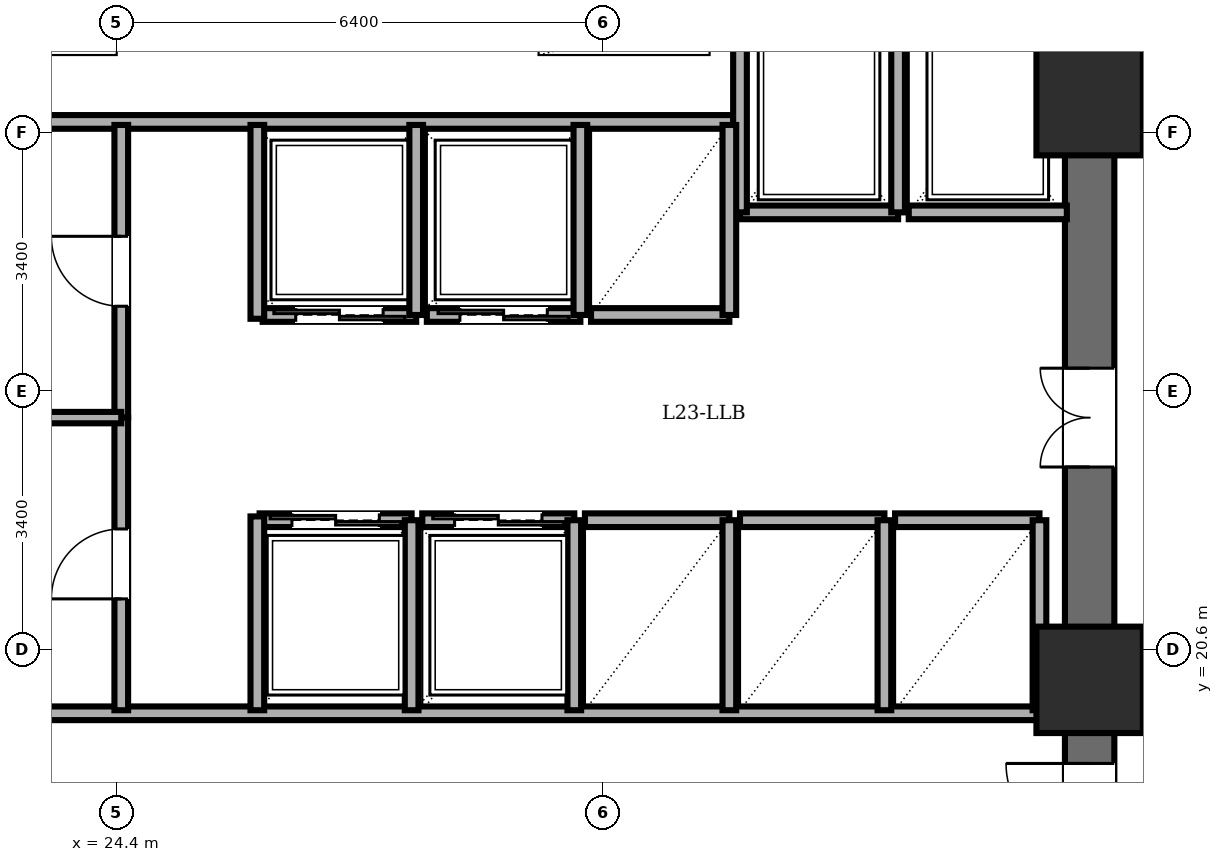
"""IFC4 building model, lengths in metres.
Left out: names, types, materials, properties, quantities, classifications, styles, units other than length and angle.
Written with IfcOpenShell. Run it as: python <this file> out.ifc"""

import sys

from ifc_helpers import new_model, si_unit, direction, frame, frame_2d, origin, origin_2d, place, context, subcontext, project, spatial, rectangle, extrude, element, fill, save


model = new_model("IFC4")
c1 = context("Model", 3, precision=1e-05, world=origin(), true_north=direction((0.0, 1.0)))
c2 = subcontext(c1, "Body", "Model", "MODEL_VIEW")
j1 = project(units=[si_unit("LENGTHUNIT", "METRE"), si_unit("PLANEANGLEUNIT", "RADIAN")], contexts=[c1])
p1 = place(None, origin())
s1 = spatial("IfcSite", under=j1, at=p1, CompositionType="ELEMENT")
p2 = place(p1, origin())
s2 = spatial("IfcBuilding", under=s1, at=p2, CompositionType="ELEMENT")
p3 = place(p2, frame((0.0, 0.0, 89.9)))
s3 = spatial("IfcBuildingStorey", under=s2, at=p3, CompositionType="ELEMENT", Elevation=89.9)
for number, where, z_axis, x_axis in (
    (1, (37.2, 20.2, 0.0), (0.0, 0.0, 1.0), (1.0, 0.0, 0.0)),
    (2, (37.2, 27.8, 0.0), (0.0, 0.0, 1.0), (1.0, 0.0, 0.0)),
):
    element("IfcColumn", number, at=place(p3, frame(where, z_axis=z_axis, x_axis=x_axis)), inside=s3, PredefinedType="COLUMN", context=c2, shape_type="SweptSolid", body=[
        extrude(rectangle(XDim=1.4, YDim=1.4, at=origin_2d()), origin(), (0.0, 0.0, 1.0), 3.6),
    ])
p4 = place(p3, frame((37.2, 14.4, 0.0), z_axis=(0.0, 0.0, 1.0), x_axis=(0.0, 1.0, 0.0)))
e3 = element("IfcWall", 3, at=p4, inside=s3, PredefinedType="SHEAR", context=c2, shape_type="SweptSolid", body=[
    extrude(rectangle(XDim=19.2, YDim=0.65, at=frame_2d((9.6, 0.0))), origin(), (0.0, 0.0, 1.0), 3.4),
])
p5 = place(p4, frame((15.8, 0.0, 0.0)))
e4 = element("IfcOpeningElement", 4, at=p5, cuts=e3, PredefinedType="OPENING", context=c2, shape_type="SweptSolid", body=[
    extrude(rectangle(XDim=1.15, YDim=2.15, at=frame_2d((0.575, 1.075))), frame((0.0, 0.335, 0.0), z_axis=(0.0, -1.0, 0.0), x_axis=(1.0, 0.0, 0.0)), (0.0, 0.0, 1.0), 0.67),
])
p6 = place(p4, frame((3.6, 0.0, 0.0)))
e5 = element("IfcOpeningElement", 5, at=p6, cuts=e3, PredefinedType="OPENING", context=c2, shape_type="SweptSolid", body=[
    extrude(rectangle(XDim=1.1, YDim=2.15, at=frame_2d((0.55, 1.075))), frame((0.0, 0.335, 0.0), z_axis=(0.0, -1.0, 0.0), x_axis=(1.0, 0.0, 0.0)), (0.0, 0.0, 1.0), 0.67),
])
p7 = place(p4, frame((8.6, 0.0, 0.0)))
e6 = element("IfcOpeningElement", 6, at=p7, cuts=e3, PredefinedType="OPENING", context=c2, shape_type="SweptSolid", body=[
    extrude(rectangle(XDim=1.3, YDim=2.2, at=frame_2d((0.65, 1.1))), frame((0.0, 0.335, 0.0), z_axis=(0.0, -1.0, 0.0), x_axis=(1.0, 0.0, 0.0)), (0.0, 0.0, 1.0), 0.67),
])
p8 = place(p3, frame((21.95, 27.54, 0.0), z_axis=(0.0, 0.0, 1.0), x_axis=(1.0, 0.0, 0.0)))
e7 = element("IfcWall", 7, at=p8, inside=s3, PredefinedType="PARTITIONING", context=c2, shape_type="SweptSolid", body=[
    extrude(rectangle(XDim=10.56, YDim=0.18, at=frame_2d((5.28, 0.0))), origin(), (0.0, 0.0, 1.0), 3.4),
])
p9 = place(p3, frame((21.95, 19.76, 0.0), z_axis=(0.0, 0.0, 1.0), x_axis=(1.0, 0.0, 0.0)))
e8 = element("IfcWall", 8, at=p9, inside=s3, PredefinedType="PARTITIONING", context=c2, shape_type="SweptSolid", body=[
    extrude(rectangle(XDim=14.87, YDim=0.18, at=frame_2d((7.435, 0.0))), origin(), (0.0, 0.0, 1.0), 3.4),
])
p10 = place(p3, frame((34.68, 26.35, 0.0), z_axis=(0.0, 0.0, 1.0), x_axis=(-1.0, 0.0, 0.0)))
e9 = element("IfcWall", 9, at=p10, inside=s3, PredefinedType="PARTITIONING", context=c2, shape_type="SweptSolid", body=[
    extrude(rectangle(XDim=2.08, YDim=0.18, at=frame_2d((1.04, 0.0))), origin(), (0.0, 0.0, 1.0), 3.4),
])
for number, where, z_axis, x_axis in (
    (10, (34.68, 26.35, 0.0), (0.0, 0.0, 1.0), (0.0, 1.0, 0.0)),
    (11, (32.6, 29.08, 0.0), (0.0, 0.0, 1.0), (0.0, -1.0, 0.0)),
):
    element("IfcWall", number, at=place(p3, frame(where, z_axis=z_axis, x_axis=x_axis)), inside=s3, PredefinedType="PARTITIONING", context=c2, shape_type="SweptSolid", body=[
        extrude(rectangle(XDim=2.73, YDim=0.18, at=frame_2d((1.365, 0.0))), origin(), (0.0, 0.0, 1.0), 3.4),
    ])
p11 = place(p3, frame((36.9, 26.35, 0.0), z_axis=(0.0, 0.0, 1.0), x_axis=(-1.0, 0.0, 0.0)))
e12 = element("IfcWall", 12, at=p11, inside=s3, PredefinedType="PARTITIONING", context=c2, shape_type="SweptSolid", body=[
    extrude(rectangle(XDim=2.08, YDim=0.18, at=frame_2d((1.04, 0.0))), origin(), (0.0, 0.0, 1.0), 3.4),
])
p12 = place(p3, frame((28.34, 25.0, 0.0), z_axis=(0.0, 0.0, 1.0), x_axis=(-1.0, 0.0, 0.0)))
e13 = element("IfcWall", 13, at=p12, inside=s3, PredefinedType="PARTITIONING", context=c2, shape_type="SweptSolid", body=[
    extrude(rectangle(XDim=2.02, YDim=0.18, at=frame_2d((1.01, 0.0))), origin(), (0.0, 0.0, 1.0), 3.4),
])
p13 = place(p12, frame((0.435, 0.0, 0.0)))
e14 = element("IfcOpeningElement", 14, at=p13, cuts=e13, PredefinedType="OPENING", context=c2, shape_type="SweptSolid", body=[
    extrude(rectangle(XDim=1.15, YDim=2.2, at=frame_2d((0.575, 1.1))), frame((0.0, 0.1, 0.0), z_axis=(0.0, -1.0, 0.0), x_axis=(1.0, 0.0, 0.0)), (0.0, 0.0, 1.0), 0.2),
])
p14 = place(p3, frame((28.34, 25.0, 0.0), z_axis=(0.0, 0.0, 1.0), x_axis=(0.0, 1.0, 0.0)))
e15 = element("IfcWall", 15, at=p14, inside=s3, PredefinedType="PARTITIONING", context=c2, shape_type="SweptSolid", body=[
    extrude(rectangle(XDim=2.5, YDim=0.18, at=frame_2d((1.25, 0.0))), origin(), (0.0, 0.0, 1.0), 3.4),
])
p15 = place(p3, frame((30.5, 25.0, 0.0), z_axis=(0.0, 0.0, 1.0), x_axis=(-1.0, 0.0, 0.0)))
e16 = element("IfcWall", 16, at=p15, inside=s3, PredefinedType="PARTITIONING", context=c2, shape_type="SweptSolid", body=[
    extrude(rectangle(XDim=2.02, YDim=0.18, at=frame_2d((1.01, 0.0))), origin(), (0.0, 0.0, 1.0), 3.4),
])
p16 = place(p15, frame((0.435, 0.0, 0.0)))
e17 = element("IfcOpeningElement", 17, at=p16, cuts=e16, PredefinedType="OPENING", context=c2, shape_type="SweptSolid", body=[
    extrude(rectangle(XDim=1.15, YDim=2.2, at=frame_2d((0.575, 1.1))), frame((0.0, 0.1, 0.0), z_axis=(0.0, -1.0, 0.0), x_axis=(1.0, 0.0, 0.0)), (0.0, 0.0, 1.0), 0.2),
])
p17 = place(p3, frame((30.5, 25.0, 0.0), z_axis=(0.0, 0.0, 1.0), x_axis=(0.0, 1.0, 0.0)))
e18 = element("IfcWall", 18, at=p17, inside=s3, PredefinedType="PARTITIONING", context=c2, shape_type="SweptSolid", body=[
    extrude(rectangle(XDim=2.5, YDim=0.18, at=frame_2d((1.25, 0.0))), origin(), (0.0, 0.0, 1.0), 3.4),
])
p18 = place(p3, frame((26.28, 22.3, 0.0), z_axis=(0.0, 0.0, 1.0), x_axis=(1.0, 0.0, 0.0)))
e19 = element("IfcWall", 19, at=p18, inside=s3, PredefinedType="PARTITIONING", context=c2, shape_type="SweptSolid", body=[
    extrude(rectangle(XDim=2.0, YDim=0.18, at=frame_2d((1.0, 0.0))), origin(), (0.0, 0.0, 1.0), 3.4),
])
p19 = place(p18, frame((0.425, 0.0, 0.0)))
e20 = element("IfcOpeningElement", 20, at=p19, cuts=e19, PredefinedType="OPENING", context=c2, shape_type="SweptSolid", body=[
    extrude(rectangle(XDim=1.15, YDim=2.2, at=frame_2d((0.575, 1.1))), frame((0.0, 0.1, 0.0), z_axis=(0.0, -1.0, 0.0), x_axis=(1.0, 0.0, 0.0)), (0.0, 0.0, 1.0), 0.2),
])
p20 = place(p3, frame((28.28, 19.8, 0.0), z_axis=(0.0, 0.0, 1.0), x_axis=(0.0, 1.0, 0.0)))
e21 = element("IfcWall", 21, at=p20, inside=s3, PredefinedType="PARTITIONING", context=c2, shape_type="SweptSolid", body=[
    extrude(rectangle(XDim=2.5, YDim=0.18, at=frame_2d((1.25, 0.0))), origin(), (0.0, 0.0, 1.0), 3.4),
])
p21 = place(p3, frame((28.42, 22.3, 0.0), z_axis=(0.0, 0.0, 1.0), x_axis=(1.0, 0.0, 0.0)))
e22 = element("IfcWall", 22, at=p21, inside=s3, PredefinedType="PARTITIONING", context=c2, shape_type="SweptSolid", body=[
    extrude(rectangle(XDim=2.0, YDim=0.18, at=frame_2d((1.0, 0.0))), origin(), (0.0, 0.0, 1.0), 3.4),
])
p22 = place(p21, frame((0.425, 0.0, 0.0)))
e23 = element("IfcOpeningElement", 23, at=p22, cuts=e22, PredefinedType="OPENING", context=c2, shape_type="SweptSolid", body=[
    extrude(rectangle(XDim=1.15, YDim=2.2, at=frame_2d((0.575, 1.1))), frame((0.0, 0.1, 0.0), z_axis=(0.0, -1.0, 0.0), x_axis=(1.0, 0.0, 0.0)), (0.0, 0.0, 1.0), 0.2),
])
p23 = place(p3, frame((30.42, 19.8, 0.0), z_axis=(0.0, 0.0, 1.0), x_axis=(0.0, 1.0, 0.0)))
e24 = element("IfcWall", 24, at=p23, inside=s3, PredefinedType="PARTITIONING", context=c2, shape_type="SweptSolid", body=[
    extrude(rectangle(XDim=2.5, YDim=0.18, at=frame_2d((1.25, 0.0))), origin(), (0.0, 0.0, 1.0), 3.4),
])
p24 = place(p3, frame((32.46, 25.0, 0.0), z_axis=(0.0, 0.0, 1.0), x_axis=(-1.0, 0.0, 0.0)))
e25 = element("IfcWall", 25, at=p24, inside=s3, PredefinedType="PARTITIONING", context=c2, shape_type="SweptSolid", body=[
    extrude(rectangle(XDim=1.82, YDim=0.18, at=frame_2d((0.91, 0.0))), origin(), (0.0, 0.0, 1.0), 3.4),
])
p25 = place(p3, frame((32.46, 25.0, 0.0), z_axis=(0.0, 0.0, 1.0), x_axis=(0.0, 1.0, 0.0)))
e26 = element("IfcWall", 26, at=p25, inside=s3, PredefinedType="PARTITIONING", context=c2, shape_type="SweptSolid", body=[
    extrude(rectangle(XDim=2.5, YDim=0.18, at=frame_2d((1.25, 0.0))), origin(), (0.0, 0.0, 1.0), 3.4),
])
p26 = place(p3, frame((30.56, 22.3, 0.0), z_axis=(0.0, 0.0, 1.0), x_axis=(1.0, 0.0, 0.0)))
e27 = element("IfcWall", 27, at=p26, inside=s3, PredefinedType="PARTITIONING", context=c2, shape_type="SweptSolid", body=[
    extrude(rectangle(XDim=1.9, YDim=0.18, at=frame_2d((0.95, 0.0))), origin(), (0.0, 0.0, 1.0), 3.4),
])
p27 = place(p3, frame((32.46, 19.8, 0.0), z_axis=(0.0, 0.0, 1.0), x_axis=(0.0, 1.0, 0.0)))
e28 = element("IfcWall", 28, at=p27, inside=s3, PredefinedType="PARTITIONING", context=c2, shape_type="SweptSolid", body=[
    extrude(rectangle(XDim=2.5, YDim=0.18, at=frame_2d((1.25, 0.0))), origin(), (0.0, 0.0, 1.0), 3.4),
])
p28 = place(p3, frame((32.6, 22.3, 0.0), z_axis=(0.0, 0.0, 1.0), x_axis=(1.0, 0.0, 0.0)))
e29 = element("IfcWall", 29, at=p28, inside=s3, PredefinedType="PARTITIONING", context=c2, shape_type="SweptSolid", body=[
    extrude(rectangle(XDim=1.9, YDim=0.18, at=frame_2d((0.95, 0.0))), origin(), (0.0, 0.0, 1.0), 3.4),
])
p29 = place(p3, frame((34.5, 19.8, 0.0), z_axis=(0.0, 0.0, 1.0), x_axis=(0.0, 1.0, 0.0)))
e30 = element("IfcWall", 30, at=p29, inside=s3, PredefinedType="PARTITIONING", context=c2, shape_type="SweptSolid", body=[
    extrude(rectangle(XDim=2.5, YDim=0.18, at=frame_2d((1.25, 0.0))), origin(), (0.0, 0.0, 1.0), 3.4),
])
p30 = place(p3, frame((34.64, 22.3, 0.0), z_axis=(0.0, 0.0, 1.0), x_axis=(1.0, 0.0, 0.0)))
e31 = element("IfcWall", 31, at=p30, inside=s3, PredefinedType="PARTITIONING", context=c2, shape_type="SweptSolid", body=[
    extrude(rectangle(XDim=1.9, YDim=0.18, at=frame_2d((0.95, 0.0))), origin(), (0.0, 0.0, 1.0), 3.4),
])
p31 = place(p3, frame((36.54, 19.8, 0.0), z_axis=(0.0, 0.0, 1.0), x_axis=(0.0, 1.0, 0.0)))
e32 = element("IfcWall", 32, at=p31, inside=s3, PredefinedType="PARTITIONING", context=c2, shape_type="SweptSolid", body=[
    extrude(rectangle(XDim=2.5, YDim=0.18, at=frame_2d((1.25, 0.0))), origin(), (0.0, 0.0, 1.0), 3.4),
])
p32 = place(p3, frame((24.46, 23.65, 0.0), z_axis=(0.0, 0.0, 1.0), x_axis=(0.0, 1.0, 0.0)))
e33 = element("IfcWall", 33, at=p32, inside=s3, PredefinedType="PARTITIONING", context=c2, shape_type="SweptSolid", body=[
    extrude(rectangle(XDim=3.85, YDim=0.18, at=frame_2d((1.925, 0.0))), origin(), (0.0, 0.0, 1.0), 3.4),
])
p33 = place(p32, frame((1.465, 0.0, 0.0)))
e34 = element("IfcOpeningElement", 34, at=p33, cuts=e33, PredefinedType="OPENING", context=c2, shape_type="SweptSolid", body=[
    extrude(rectangle(XDim=0.92, YDim=2.1, at=frame_2d((0.46, 1.05))), frame((0.0, 0.1, 0.0), z_axis=(0.0, -1.0, 0.0), x_axis=(1.0, 0.0, 0.0)), (0.0, 0.0, 1.0), 0.2),
])
p34 = place(p3, frame((24.46, 19.8, 0.0), z_axis=(0.0, 0.0, 1.0), x_axis=(0.0, 1.0, 0.0)))
e35 = element("IfcWall", 35, at=p34, inside=s3, PredefinedType="PARTITIONING", context=c2, shape_type="SweptSolid", body=[
    extrude(rectangle(XDim=3.85, YDim=0.18, at=frame_2d((1.925, 0.0))), origin(), (0.0, 0.0, 1.0), 3.4),
])
p35 = place(p34, frame((1.465, 0.0, 0.0)))
e36 = element("IfcOpeningElement", 36, at=p35, cuts=e35, PredefinedType="OPENING", context=c2, shape_type="SweptSolid", body=[
    extrude(rectangle(XDim=0.92, YDim=2.1, at=frame_2d((0.46, 1.05))), frame((0.0, 0.1, 0.0), z_axis=(0.0, -1.0, 0.0), x_axis=(1.0, 0.0, 0.0)), (0.0, 0.0, 1.0), 0.2),
])
p36 = place(p3, frame((21.95, 23.65, 0.0), z_axis=(0.0, 0.0, 1.0), x_axis=(1.0, 0.0, 0.0)))
e37 = element("IfcWall", 37, at=p36, inside=s3, PredefinedType="PARTITIONING", context=c2, shape_type="SweptSolid", body=[
    extrude(rectangle(XDim=2.51, YDim=0.15, at=frame_2d((1.255, 0.0))), origin(), (0.0, 0.0, 1.0), 3.4),
])
for number, where, z_axis, x_axis in (
    (38, (26.25, 24.95, 0.0), (0.0, 0.0, 1.0), (0.0, 1.0, 0.0)),
    (39, (26.25, 19.8, 0.0), (0.0, 0.0, 1.0), (0.0, 1.0, 0.0)),
):
    element("IfcWall", number, at=place(p3, frame(where, z_axis=z_axis, x_axis=x_axis)), inside=s3, PredefinedType="PARTITIONING", context=c2, shape_type="SweptSolid", body=[
        extrude(rectangle(XDim=2.55, YDim=0.18, at=frame_2d((1.275, 0.0))), origin(), (0.0, 0.0, 1.0), 3.4),
    ])
p37 = place(p6, origin())
e40 = element("IfcDoor", 40, at=p37, inside=s3, OperationType="SINGLE_SWING_RIGHT", PredefinedType="DOOR", context=c2, shape_type="SweptSolid", body=[
    extrude(rectangle(XDim=1.1, YDim=2.15, at=frame_2d((0.55, 1.075))), frame((0.0, 0.025, 0.0), z_axis=(0.0, -1.0, 0.0), x_axis=(1.0, 0.0, 0.0)), (0.0, 0.0, 1.0), 0.05),
])
fill(e5, e40)
p38 = place(p13, origin())
e41 = element("IfcDoor", 41, at=p38, inside=s3, OperationType="DOUBLE_DOOR_SLIDING", PredefinedType="DOOR", context=c2, shape_type="SweptSolid", body=[
    extrude(rectangle(XDim=1.15, YDim=2.2, at=frame_2d((0.575, 1.1))), frame((0.0, 0.025, 0.0), z_axis=(0.0, -1.0, 0.0), x_axis=(1.0, 0.0, 0.0)), (0.0, 0.0, 1.0), 0.05),
])
fill(e14, e41)
p39 = place(p16, origin())
e42 = element("IfcDoor", 42, at=p39, inside=s3, OperationType="DOUBLE_DOOR_SLIDING", PredefinedType="DOOR", context=c2, shape_type="SweptSolid", body=[
    extrude(rectangle(XDim=1.15, YDim=2.2, at=frame_2d((0.575, 1.1))), frame((0.0, 0.025, 0.0), z_axis=(0.0, -1.0, 0.0), x_axis=(1.0, 0.0, 0.0)), (0.0, 0.0, 1.0), 0.05),
])
fill(e17, e42)
p40 = place(p19, origin())
e43 = element("IfcDoor", 43, at=p40, inside=s3, OperationType="DOUBLE_DOOR_SLIDING", PredefinedType="DOOR", context=c2, shape_type="SweptSolid", body=[
    extrude(rectangle(XDim=1.15, YDim=2.2, at=frame_2d((0.575, 1.1))), frame((0.0, 0.025, 0.0), z_axis=(0.0, -1.0, 0.0), x_axis=(1.0, 0.0, 0.0)), (0.0, 0.0, 1.0), 0.05),
])
fill(e20, e43)
p41 = place(p22, origin())
e44 = element("IfcDoor", 44, at=p41, inside=s3, OperationType="DOUBLE_DOOR_SLIDING", PredefinedType="DOOR", context=c2, shape_type="SweptSolid", body=[
    extrude(rectangle(XDim=1.15, YDim=2.2, at=frame_2d((0.575, 1.1))), frame((0.0, 0.025, 0.0), z_axis=(0.0, -1.0, 0.0), x_axis=(1.0, 0.0, 0.0)), (0.0, 0.0, 1.0), 0.05),
])
fill(e23, e44)
p42 = place(p33, origin())
e45 = element("IfcDoor", 45, at=p42, inside=s3, OperationType="SINGLE_SWING_RIGHT", PredefinedType="DOOR", context=c2, shape_type="SweptSolid", body=[
    extrude(rectangle(XDim=0.92, YDim=2.1, at=frame_2d((0.46, 1.05))), frame((0.0, 0.025, 0.0), z_axis=(0.0, -1.0, 0.0), x_axis=(1.0, 0.0, 0.0)), (0.0, 0.0, 1.0), 0.05),
])
fill(e34, e45)
p43 = place(p35, origin())
e46 = element("IfcDoor", 46, at=p43, inside=s3, OperationType="SINGLE_SWING_LEFT", PredefinedType="DOOR", context=c2, shape_type="SweptSolid", body=[
    extrude(rectangle(XDim=0.92, YDim=2.1, at=frame_2d((0.46, 1.05))), frame((0.0, 0.025, 0.0), z_axis=(0.0, -1.0, 0.0), x_axis=(1.0, 0.0, 0.0)), (0.0, 0.0, 1.0), 0.05),
])
fill(e36, e46)
p44 = place(p7, origin())
e47 = element("IfcDoor", 47, at=p44, inside=s3, OperationType="DOUBLE_DOOR_SINGLE_SWING", PredefinedType="DOOR", context=c2, shape_type="SweptSolid", body=[
    extrude(rectangle(XDim=1.3, YDim=2.2, at=frame_2d((0.65, 1.1))), frame((0.0, 0.025, 0.0), z_axis=(0.0, -1.0, 0.0), x_axis=(1.0, 0.0, 0.0)), (0.0, 0.0, 1.0), 0.05),
])
fill(e6, e47)
save(model, sys.argv[1])
